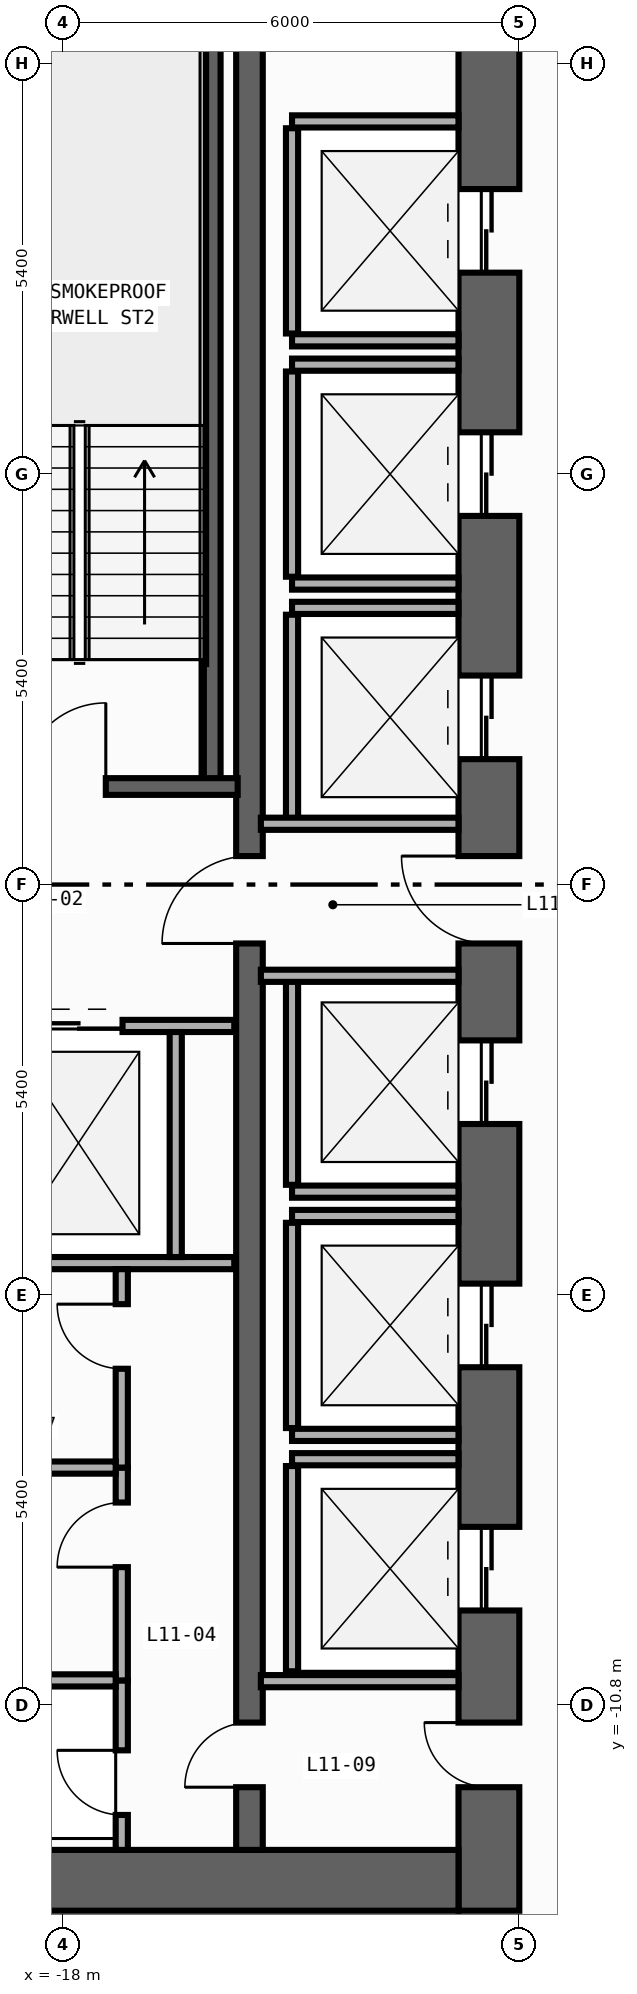
"""IFC4 building model, lengths in metres.
Left out: names, types, materials, properties, quantities, classifications, styles, units other than length and angle.
Written with IfcOpenShell. Run it as: python <this file> out.ifc"""

import sys

from ifc_helpers import new_model, si_unit, direction, frame, frame_2d, origin, place, context, subcontext, project, spatial, rectangle, extrude, element, fill, save


model = new_model("IFC4")
c1 = context("Model", 3, precision=1e-05, world=origin(), true_north=direction((0.0, 1.0)))
c2 = subcontext(c1, "Body", "Model", "MODEL_VIEW")
j1 = project(units=[si_unit("LENGTHUNIT", "METRE"), si_unit("PLANEANGLEUNIT", "RADIAN")], contexts=[c1])
p1 = place(None, origin())
s1 = spatial("IfcSite", under=j1, at=p1, CompositionType="ELEMENT")
p2 = place(p1, origin())
s2 = spatial("IfcBuilding", under=s1, at=p2, CompositionType="ELEMENT")
p3 = place(p2, frame((0.0, 0.0, 47.0)))
s3 = spatial("IfcBuildingStorey", under=s2, at=p3, CompositionType="ELEMENT", Elevation=47.0)
p4 = place(p3, frame((-12.4, -13.5, 0.0), z_axis=(0.0, 0.0, 1.0), x_axis=(0.0, 1.0, 0.0)))
e1 = element("IfcWall", 1, at=p4, inside=s3, PredefinedType="SHEAR", context=c2, shape_type="SweptSolid", body=[
    extrude(rectangle(XDim=27.0, YDim=0.8, at=frame_2d((13.5, 0.0))), origin(), (0.0, 0.0, 1.0), 3.94),
])
p5 = place(p4, frame((21.55, 0.0, 0.0)))
e2 = element("IfcOpeningElement", 2, at=p5, cuts=e1, PredefinedType="OPENING", context=c2, shape_type="SweptSolid", body=[
    extrude(rectangle(XDim=1.1, YDim=2.2, at=frame_2d((0.55, 1.1))), frame((0.0, 0.41, 0.0), z_axis=(0.0, -1.0, 0.0), x_axis=(1.0, 0.0, 0.0)), (0.0, 0.0, 1.0), 0.82),
])
p6 = place(p4, frame((18.35, 0.0, 0.0)))
e3 = element("IfcOpeningElement", 3, at=p6, cuts=e1, PredefinedType="OPENING", context=c2, shape_type="SweptSolid", body=[
    extrude(rectangle(XDim=1.1, YDim=2.2, at=frame_2d((0.55, 1.1))), frame((0.0, 0.41, 0.0), z_axis=(0.0, -1.0, 0.0), x_axis=(1.0, 0.0, 0.0)), (0.0, 0.0, 1.0), 0.82),
])
p7 = place(p4, frame((15.15, 0.0, 0.0)))
e4 = element("IfcOpeningElement", 4, at=p7, cuts=e1, PredefinedType="OPENING", context=c2, shape_type="SweptSolid", body=[
    extrude(rectangle(XDim=1.1, YDim=2.2, at=frame_2d((0.55, 1.1))), frame((0.0, 0.41, 0.0), z_axis=(0.0, -1.0, 0.0), x_axis=(1.0, 0.0, 0.0)), (0.0, 0.0, 1.0), 0.82),
])
p8 = place(p4, frame((10.35, 0.0, 0.0)))
e5 = element("IfcOpeningElement", 5, at=p8, cuts=e1, PredefinedType="OPENING", context=c2, shape_type="SweptSolid", body=[
    extrude(rectangle(XDim=1.1, YDim=2.2, at=frame_2d((0.55, 1.1))), frame((0.0, 0.41, 0.0), z_axis=(0.0, -1.0, 0.0), x_axis=(1.0, 0.0, 0.0)), (0.0, 0.0, 1.0), 0.82),
])
p9 = place(p4, frame((7.15, 0.0, 0.0)))
e6 = element("IfcOpeningElement", 6, at=p9, cuts=e1, PredefinedType="OPENING", context=c2, shape_type="SweptSolid", body=[
    extrude(rectangle(XDim=1.1, YDim=2.2, at=frame_2d((0.55, 1.1))), frame((0.0, 0.41, 0.0), z_axis=(0.0, -1.0, 0.0), x_axis=(1.0, 0.0, 0.0)), (0.0, 0.0, 1.0), 0.82),
])
p10 = place(p4, frame((3.95, 0.0, 0.0)))
e7 = element("IfcOpeningElement", 7, at=p10, cuts=e1, PredefinedType="OPENING", context=c2, shape_type="SweptSolid", body=[
    extrude(rectangle(XDim=1.1, YDim=2.2, at=frame_2d((0.55, 1.1))), frame((0.0, 0.41, 0.0), z_axis=(0.0, -1.0, 0.0), x_axis=(1.0, 0.0, 0.0)), (0.0, 0.0, 1.0), 0.82),
])
p11 = place(p4, frame((12.725, 0.0, 0.0)))
e8 = element("IfcOpeningElement", 8, at=p11, cuts=e1, PredefinedType="OPENING", context=c2, shape_type="SweptSolid", body=[
    extrude(rectangle(XDim=1.15, YDim=2.2, at=frame_2d((0.575, 1.1))), frame((0.0, 0.41, 0.0), z_axis=(0.0, -1.0, 0.0), x_axis=(1.0, 0.0, 0.0)), (0.0, 0.0, 1.0), 0.82),
])
p12 = place(p4, frame((1.625, 0.0, 0.0)))
e9 = element("IfcOpeningElement", 9, at=p12, cuts=e1, PredefinedType="OPENING", context=c2, shape_type="SweptSolid", body=[
    extrude(rectangle(XDim=0.85, YDim=2.1, at=frame_2d((0.425, 1.05))), frame((0.0, 0.41, 0.0), z_axis=(0.0, -1.0, 0.0), x_axis=(1.0, 0.0, 0.0)), (0.0, 0.0, 1.0), 0.82),
])
p13 = place(p3, frame((-19.6, -13.1, 0.0), z_axis=(0.0, 0.0, 1.0), x_axis=(1.0, 0.0, 0.0)))
e10 = element("IfcWall", 10, at=p13, inside=s3, PredefinedType="SHEAR", context=c2, shape_type="SweptSolid", body=[
    extrude(rectangle(XDim=6.8, YDim=0.8, at=frame_2d((3.4, 0.0))), origin(), (0.0, 0.0, 1.0), 3.94),
])
p14 = place(p3, frame((-15.55, -12.7, 0.0), z_axis=(0.0, 0.0, 1.0), x_axis=(0.0, 1.0, 0.0)))
e11 = element("IfcWall", 11, at=p14, inside=s3, PredefinedType="SHEAR", context=c2, shape_type="SweptSolid", body=[
    extrude(rectangle(XDim=25.4, YDim=0.35, at=frame_2d((12.7, 0.0))), origin(), (0.0, 0.0, 1.0), 3.94),
])
p15 = place(p14, frame((11.925, 0.0, 0.0)))
e12 = element("IfcOpeningElement", 12, at=p15, cuts=e11, PredefinedType="OPENING", context=c2, shape_type="SweptSolid", body=[
    extrude(rectangle(XDim=1.15, YDim=2.2, at=frame_2d((0.575, 1.1))), frame((0.0, 0.185, 0.0), z_axis=(0.0, -1.0, 0.0), x_axis=(1.0, 0.0, 0.0)), (0.0, 0.0, 1.0), 0.37),
])
p16 = place(p14, frame((0.825, 0.0, 0.0)))
e13 = element("IfcOpeningElement", 13, at=p16, cuts=e11, PredefinedType="OPENING", context=c2, shape_type="SweptSolid", body=[
    extrude(rectangle(XDim=0.85, YDim=2.1, at=frame_2d((0.425, 1.05))), frame((0.0, 0.185, 0.0), z_axis=(0.0, -1.0, 0.0), x_axis=(1.0, 0.0, 0.0)), (0.0, 0.0, 1.0), 0.37),
])
p17 = place(p3, frame((-16.04, 1.29, 0.0), z_axis=(0.0, 0.0, 1.0), x_axis=(0.0, 1.0, 0.0)))
e14 = element("IfcWall", 14, at=p17, inside=s3, PredefinedType="SHEAR", context=c2, shape_type="SweptSolid", body=[
    extrude(rectangle(XDim=11.3, YDim=0.22, at=frame_2d((5.65, 0.0))), origin(), (0.0, 0.0, 1.0), 3.94),
])
p18 = place(p3, frame((-19.62, 1.29, 0.0), z_axis=(0.0, 0.0, 1.0), x_axis=(1.0, 0.0, 0.0)))
e15 = element("IfcWall", 15, at=p18, inside=s3, PredefinedType="SHEAR", context=c2, shape_type="SweptSolid", body=[
    extrude(rectangle(XDim=3.915, YDim=0.22, at=frame_2d((1.958, 0.0))), origin(), (0.0, 0.0, 1.0), 3.94),
])
p19 = place(p18, frame((1.08, 0.0, 0.0)))
e16 = element("IfcOpeningElement", 16, at=p19, cuts=e15, PredefinedType="OPENING", context=c2, shape_type="SweptSolid", body=[
    extrude(rectangle(XDim=1.1, YDim=2.2, at=frame_2d((0.55, 1.1))), frame((0.0, 0.12, 0.0), z_axis=(0.0, -1.0, 0.0), x_axis=(1.0, 0.0, 0.0)), (0.0, 0.0, 1.0), 0.24),
])
for number, where, z_axis, x_axis in (
    (17, (-14.99, 7.16, 0.0), (0.0, 0.0, 1.0), (1.0, 0.0, 0.0)),
    (18, (-14.99, 10.04, 0.0), (0.0, 0.0, 1.0), (1.0, 0.0, 0.0)),
):
    element("IfcWall", number, at=place(p3, frame(where, z_axis=z_axis, x_axis=x_axis)), inside=s3, PredefinedType="STANDARD", context=c2, shape_type="SweptSolid", body=[
        extrude(rectangle(XDim=2.19, YDim=0.16, at=frame_2d((1.095, 0.0))), origin(), (0.0, 0.0, 1.0), 3.94),
    ])
p20 = place(p3, frame((-14.99, 7.25, 0.0), z_axis=(0.0, 0.0, 1.0), x_axis=(0.0, 1.0, 0.0)))
e19 = element("IfcWall", 19, at=p20, inside=s3, PredefinedType="STANDARD", context=c2, shape_type="SweptSolid", body=[
    extrude(rectangle(XDim=2.7, YDim=0.16, at=frame_2d((1.35, 0.0))), origin(), (0.0, 0.0, 1.0), 3.94),
])
for number, where, z_axis, x_axis in (
    (20, (-14.99, 3.96, 0.0), (0.0, 0.0, 1.0), (1.0, 0.0, 0.0)),
    (21, (-14.99, 6.84, 0.0), (0.0, 0.0, 1.0), (1.0, 0.0, 0.0)),
):
    element("IfcWall", number, at=place(p3, frame(where, z_axis=z_axis, x_axis=x_axis)), inside=s3, PredefinedType="STANDARD", context=c2, shape_type="SweptSolid", body=[
        extrude(rectangle(XDim=2.19, YDim=0.16, at=frame_2d((1.095, 0.0))), origin(), (0.0, 0.0, 1.0), 3.94),
    ])
p21 = place(p3, frame((-14.99, 4.05, 0.0), z_axis=(0.0, 0.0, 1.0), x_axis=(0.0, 1.0, 0.0)))
e22 = element("IfcWall", 22, at=p21, inside=s3, PredefinedType="STANDARD", context=c2, shape_type="SweptSolid", body=[
    extrude(rectangle(XDim=2.7, YDim=0.16, at=frame_2d((1.35, 0.0))), origin(), (0.0, 0.0, 1.0), 3.94),
])
p22 = place(p3, frame((-14.99, 3.64, 0.0), z_axis=(0.0, 0.0, 1.0), x_axis=(1.0, 0.0, 0.0)))
e23 = element("IfcWall", 23, at=p22, inside=s3, PredefinedType="STANDARD", context=c2, shape_type="SweptSolid", body=[
    extrude(rectangle(XDim=2.19, YDim=0.16, at=frame_2d((1.095, 0.0))), origin(), (0.0, 0.0, 1.0), 3.94),
])
p23 = place(p3, frame((-14.99, 0.85, 0.0), z_axis=(0.0, 0.0, 1.0), x_axis=(0.0, 1.0, 0.0)))
e24 = element("IfcWall", 24, at=p23, inside=s3, PredefinedType="STANDARD", context=c2, shape_type="SweptSolid", body=[
    extrude(rectangle(XDim=2.7, YDim=0.16, at=frame_2d((1.35, 0.0))), origin(), (0.0, 0.0, 1.0), 3.94),
])
p24 = place(p3, frame((-14.99, -4.04, 0.0), z_axis=(0.0, 0.0, 1.0), x_axis=(1.0, 0.0, 0.0)))
e25 = element("IfcWall", 25, at=p24, inside=s3, PredefinedType="STANDARD", context=c2, shape_type="SweptSolid", body=[
    extrude(rectangle(XDim=2.19, YDim=0.16, at=frame_2d((1.095, 0.0))), origin(), (0.0, 0.0, 1.0), 3.94),
])
p25 = place(p3, frame((-14.99, -3.95, 0.0), z_axis=(0.0, 0.0, 1.0), x_axis=(0.0, 1.0, 0.0)))
e26 = element("IfcWall", 26, at=p25, inside=s3, PredefinedType="STANDARD", context=c2, shape_type="SweptSolid", body=[
    extrude(rectangle(XDim=2.7, YDim=0.16, at=frame_2d((1.35, 0.0))), origin(), (0.0, 0.0, 1.0), 3.94),
])
for number, where, z_axis, x_axis in (
    (27, (-14.99, -7.24, 0.0), (0.0, 0.0, 1.0), (1.0, 0.0, 0.0)),
    (28, (-14.99, -4.36, 0.0), (0.0, 0.0, 1.0), (1.0, 0.0, 0.0)),
):
    element("IfcWall", number, at=place(p3, frame(where, z_axis=z_axis, x_axis=x_axis)), inside=s3, PredefinedType="STANDARD", context=c2, shape_type="SweptSolid", body=[
        extrude(rectangle(XDim=2.19, YDim=0.16, at=frame_2d((1.095, 0.0))), origin(), (0.0, 0.0, 1.0), 3.94),
    ])
p26 = place(p3, frame((-14.99, -7.15, 0.0), z_axis=(0.0, 0.0, 1.0), x_axis=(0.0, 1.0, 0.0)))
e29 = element("IfcWall", 29, at=p26, inside=s3, PredefinedType="STANDARD", context=c2, shape_type="SweptSolid", body=[
    extrude(rectangle(XDim=2.7, YDim=0.16, at=frame_2d((1.35, 0.0))), origin(), (0.0, 0.0, 1.0), 3.94),
])
p27 = place(p3, frame((-14.99, -7.56, 0.0), z_axis=(0.0, 0.0, 1.0), x_axis=(1.0, 0.0, 0.0)))
e30 = element("IfcWall", 30, at=p27, inside=s3, PredefinedType="STANDARD", context=c2, shape_type="SweptSolid", body=[
    extrude(rectangle(XDim=2.19, YDim=0.16, at=frame_2d((1.095, 0.0))), origin(), (0.0, 0.0, 1.0), 3.94),
])
p28 = place(p3, frame((-14.99, -10.35, 0.0), z_axis=(0.0, 0.0, 1.0), x_axis=(0.0, 1.0, 0.0)))
e31 = element("IfcWall", 31, at=p28, inside=s3, PredefinedType="STANDARD", context=c2, shape_type="SweptSolid", body=[
    extrude(rectangle(XDim=2.7, YDim=0.16, at=frame_2d((1.35, 0.0))), origin(), (0.0, 0.0, 1.0), 3.94),
])
p29 = place(p3, frame((-19.55, -1.86, 0.0), z_axis=(0.0, 0.0, 1.0), x_axis=(1.0, 0.0, 0.0)))
e32 = element("IfcWall", 32, at=p29, inside=s3, PredefinedType="STANDARD", context=c2, shape_type="SweptSolid", body=[
    extrude(rectangle(XDim=3.8, YDim=0.16, at=frame_2d((1.9, 0.0))), origin(), (0.0, 0.0, 1.0), 3.94),
])
p30 = place(p29, frame((1.18, 0.0, 0.0)))
e33 = element("IfcOpeningElement", 33, at=p30, cuts=e32, PredefinedType="OPENING", context=c2, shape_type="SweptSolid", body=[
    extrude(rectangle(XDim=1.15, YDim=2.2, at=frame_2d((0.575, 1.1))), frame((0.0, 0.09, 0.0), z_axis=(0.0, -1.0, 0.0), x_axis=(1.0, 0.0, 0.0)), (0.0, 0.0, 1.0), 0.18),
])
p31 = place(p3, frame((-19.55, -4.98, 0.0), z_axis=(0.0, 0.0, 1.0), x_axis=(1.0, 0.0, 0.0)))
e34 = element("IfcWall", 34, at=p31, inside=s3, PredefinedType="STANDARD", context=c2, shape_type="SweptSolid", body=[
    extrude(rectangle(XDim=3.8, YDim=0.16, at=frame_2d((1.9, 0.0))), origin(), (0.0, 0.0, 1.0), 3.94),
])
p32 = place(p3, frame((-16.52, -4.9, 0.0), z_axis=(0.0, 0.0, 1.0), x_axis=(0.0, 1.0, 0.0)))
e35 = element("IfcWall", 35, at=p32, inside=s3, PredefinedType="STANDARD", context=c2, shape_type="SweptSolid", body=[
    extrude(rectangle(XDim=2.96, YDim=0.16, at=frame_2d((1.48, 0.0))), origin(), (0.0, 0.0, 1.0), 3.94),
])
for number, where, z_axis, x_axis in (
    (36, (-15.4, 0.8, 0.0), (0.0, 0.0, 1.0), (1.0, 0.0, 0.0)),
    (37, (-15.4, -1.2, 0.0), (0.0, 0.0, 1.0), (1.0, 0.0, 0.0)),
    (38, (-15.4, -10.48, 0.0), (0.0, 0.0, 1.0), (1.0, 0.0, 0.0)),
):
    element("IfcWall", number, at=place(p3, frame(where, z_axis=z_axis, x_axis=x_axis)), inside=s3, PredefinedType="STANDARD", context=c2, shape_type="SweptSolid", body=[
        extrude(rectangle(XDim=2.6, YDim=0.16, at=frame_2d((1.3, 0.0))), origin(), (0.0, 0.0, 1.0), 3.94),
    ])
p33 = place(p3, frame((-17.23, -12.7, 0.0), z_axis=(0.0, 0.0, 1.0), x_axis=(0.0, 1.0, 0.0)))
e39 = element("IfcWall", 39, at=p33, inside=s3, PredefinedType="PARTITIONING", context=c2, shape_type="SweptSolid", body=[
    extrude(rectangle(XDim=2.23, YDim=0.16, at=frame_2d((1.115, 0.0))), origin(), (0.0, 0.0, 1.0), 3.94),
])
p34 = place(p33, frame((0.46, 0.0, 0.0)))
e40 = element("IfcOpeningElement", 40, at=p34, cuts=e39, PredefinedType="OPENING", context=c2, shape_type="SweptSolid", body=[
    extrude(rectangle(XDim=0.85, YDim=2.1, at=frame_2d((0.425, 1.05))), frame((0.0, 0.09, 0.0), z_axis=(0.0, -1.0, 0.0), x_axis=(1.0, 0.0, 0.0)), (0.0, 0.0, 1.0), 0.18),
])
p35 = place(p3, frame((-17.23, -10.47, 0.0), z_axis=(0.0, 0.0, 1.0), x_axis=(0.0, 1.0, 0.0)))
e41 = element("IfcWall", 41, at=p35, inside=s3, PredefinedType="PARTITIONING", context=c2, shape_type="SweptSolid", body=[
    extrude(rectangle(XDim=2.8, YDim=0.16, at=frame_2d((1.4, 0.0))), origin(), (0.0, 0.0, 1.0), 3.94),
])
p36 = place(p35, frame((1.49, 0.0, 0.0)))
e42 = element("IfcOpeningElement", 42, at=p36, cuts=e41, PredefinedType="OPENING", context=c2, shape_type="SweptSolid", body=[
    extrude(rectangle(XDim=0.85, YDim=2.1, at=frame_2d((0.425, 1.05))), frame((0.0, 0.09, 0.0), z_axis=(0.0, -1.0, 0.0), x_axis=(1.0, 0.0, 0.0)), (0.0, 0.0, 1.0), 0.18),
])
p37 = place(p3, frame((-17.23, -7.67, 0.0), z_axis=(0.0, 0.0, 1.0), x_axis=(0.0, 1.0, 0.0)))
e43 = element("IfcWall", 43, at=p37, inside=s3, PredefinedType="PARTITIONING", context=c2, shape_type="SweptSolid", body=[
    extrude(rectangle(XDim=2.61, YDim=0.16, at=frame_2d((1.305, 0.0))), origin(), (0.0, 0.0, 1.0), 3.94),
])
p38 = place(p37, frame((1.3, 0.0, 0.0)))
e44 = element("IfcOpeningElement", 44, at=p38, cuts=e43, PredefinedType="OPENING", context=c2, shape_type="SweptSolid", body=[
    extrude(rectangle(XDim=0.85, YDim=2.1, at=frame_2d((0.425, 1.05))), frame((0.0, 0.09, 0.0), z_axis=(0.0, -1.0, 0.0), x_axis=(1.0, 0.0, 0.0)), (0.0, 0.0, 1.0), 0.18),
])
for number, where, z_axis, x_axis in (
    (45, (-19.6, -10.47, 0.0), (0.0, 0.0, 1.0), (1.0, 0.0, 0.0)),
    (46, (-19.6, -7.67, 0.0), (0.0, 0.0, 1.0), (1.0, 0.0, 0.0)),
):
    element("IfcWall", number, at=place(p3, frame(where, z_axis=z_axis, x_axis=x_axis)), inside=s3, PredefinedType="PARTITIONING", context=c2, shape_type="SweptSolid", body=[
        extrude(rectangle(XDim=2.29, YDim=0.16, at=frame_2d((1.145, 0.0))), origin(), (0.0, 0.0, 1.0), 3.94),
    ])
p39 = place(p19, origin())
e47 = element("IfcDoor", 47, at=p39, inside=s3, OperationType="SINGLE_SWING_RIGHT", PredefinedType="DOOR", context=c2, shape_type="SweptSolid", body=[
    extrude(rectangle(XDim=1.1, YDim=2.2, at=frame_2d((0.55, 1.1))), frame((0.0, 0.025, 0.0), z_axis=(0.0, -1.0, 0.0), x_axis=(1.0, 0.0, 0.0)), (0.0, 0.0, 1.0), 0.05),
])
fill(e16, e47)
p40 = place(p5, origin())
e48 = element("IfcDoor", 48, at=p40, inside=s3, OperationType="DOUBLE_DOOR_SLIDING", PredefinedType="DOOR", context=c2, shape_type="SweptSolid", body=[
    extrude(rectangle(XDim=1.1, YDim=2.2, at=frame_2d((0.55, 1.1))), frame((0.0, 0.025, 0.0), z_axis=(0.0, -1.0, 0.0), x_axis=(1.0, 0.0, 0.0)), (0.0, 0.0, 1.0), 0.05),
])
fill(e2, e48)
p41 = place(p6, origin())
e49 = element("IfcDoor", 49, at=p41, inside=s3, OperationType="DOUBLE_DOOR_SLIDING", PredefinedType="DOOR", context=c2, shape_type="SweptSolid", body=[
    extrude(rectangle(XDim=1.1, YDim=2.2, at=frame_2d((0.55, 1.1))), frame((0.0, 0.025, 0.0), z_axis=(0.0, -1.0, 0.0), x_axis=(1.0, 0.0, 0.0)), (0.0, 0.0, 1.0), 0.05),
])
fill(e3, e49)
p42 = place(p7, origin())
e50 = element("IfcDoor", 50, at=p42, inside=s3, OperationType="DOUBLE_DOOR_SLIDING", PredefinedType="DOOR", context=c2, shape_type="SweptSolid", body=[
    extrude(rectangle(XDim=1.1, YDim=2.2, at=frame_2d((0.55, 1.1))), frame((0.0, 0.025, 0.0), z_axis=(0.0, -1.0, 0.0), x_axis=(1.0, 0.0, 0.0)), (0.0, 0.0, 1.0), 0.05),
])
fill(e4, e50)
p43 = place(p8, origin())
e51 = element("IfcDoor", 51, at=p43, inside=s3, OperationType="DOUBLE_DOOR_SLIDING", PredefinedType="DOOR", context=c2, shape_type="SweptSolid", body=[
    extrude(rectangle(XDim=1.1, YDim=2.2, at=frame_2d((0.55, 1.1))), frame((0.0, 0.025, 0.0), z_axis=(0.0, -1.0, 0.0), x_axis=(1.0, 0.0, 0.0)), (0.0, 0.0, 1.0), 0.05),
])
fill(e5, e51)
p44 = place(p9, origin())
e52 = element("IfcDoor", 52, at=p44, inside=s3, OperationType="DOUBLE_DOOR_SLIDING", PredefinedType="DOOR", context=c2, shape_type="SweptSolid", body=[
    extrude(rectangle(XDim=1.1, YDim=2.2, at=frame_2d((0.55, 1.1))), frame((0.0, 0.025, 0.0), z_axis=(0.0, -1.0, 0.0), x_axis=(1.0, 0.0, 0.0)), (0.0, 0.0, 1.0), 0.05),
])
fill(e6, e52)
p45 = place(p10, origin())
e53 = element("IfcDoor", 53, at=p45, inside=s3, OperationType="DOUBLE_DOOR_SLIDING", PredefinedType="DOOR", context=c2, shape_type="SweptSolid", body=[
    extrude(rectangle(XDim=1.1, YDim=2.2, at=frame_2d((0.55, 1.1))), frame((0.0, 0.025, 0.0), z_axis=(0.0, -1.0, 0.0), x_axis=(1.0, 0.0, 0.0)), (0.0, 0.0, 1.0), 0.05),
])
fill(e7, e53)
p46 = place(p11, origin())
e54 = element("IfcDoor", 54, at=p46, inside=s3, OperationType="SINGLE_SWING_RIGHT", PredefinedType="DOOR", context=c2, shape_type="SweptSolid", body=[
    extrude(rectangle(XDim=1.15, YDim=2.2, at=frame_2d((0.575, 1.1))), frame((0.0, 0.025, 0.0), z_axis=(0.0, -1.0, 0.0), x_axis=(1.0, 0.0, 0.0)), (0.0, 0.0, 1.0), 0.05),
])
fill(e8, e54)
p47 = place(p15, origin())
e55 = element("IfcDoor", 55, at=p47, inside=s3, OperationType="SINGLE_SWING_LEFT", PredefinedType="DOOR", context=c2, shape_type="SweptSolid", body=[
    extrude(rectangle(XDim=1.15, YDim=2.2, at=frame_2d((0.575, 1.1))), frame((0.0, 0.025, 0.0), z_axis=(0.0, -1.0, 0.0), x_axis=(1.0, 0.0, 0.0)), (0.0, 0.0, 1.0), 0.05),
])
fill(e12, e55)
p48 = place(p12, origin())
e56 = element("IfcDoor", 56, at=p48, inside=s3, OperationType="SINGLE_SWING_RIGHT", PredefinedType="DOOR", context=c2, shape_type="SweptSolid", body=[
    extrude(rectangle(XDim=0.85, YDim=2.1, at=frame_2d((0.425, 1.05))), frame((0.0, 0.025, 0.0), z_axis=(0.0, -1.0, 0.0), x_axis=(1.0, 0.0, 0.0)), (0.0, 0.0, 1.0), 0.05),
])
fill(e9, e56)
p49 = place(p16, origin())
e57 = element("IfcDoor", 57, at=p49, inside=s3, OperationType="SINGLE_SWING_LEFT", PredefinedType="DOOR", context=c2, shape_type="SweptSolid", body=[
    extrude(rectangle(XDim=0.85, YDim=2.1, at=frame_2d((0.425, 1.05))), frame((0.0, 0.025, 0.0), z_axis=(0.0, -1.0, 0.0), x_axis=(1.0, 0.0, 0.0)), (0.0, 0.0, 1.0), 0.05),
])
fill(e13, e57)
p50 = place(p30, origin())
e58 = element("IfcDoor", 58, at=p50, inside=s3, OperationType="DOUBLE_DOOR_SLIDING", PredefinedType="DOOR", context=c2, shape_type="SweptSolid", body=[
    extrude(rectangle(XDim=1.15, YDim=2.2, at=frame_2d((0.575, 1.1))), frame((0.0, 0.025, 0.0), z_axis=(0.0, -1.0, 0.0), x_axis=(1.0, 0.0, 0.0)), (0.0, 0.0, 1.0), 0.05),
])
fill(e33, e58)
p51 = place(p34, origin())
e59 = element("IfcDoor", 59, at=p51, inside=s3, OperationType="SINGLE_SWING_RIGHT", PredefinedType="DOOR", context=c2, shape_type="SweptSolid", body=[
    extrude(rectangle(XDim=0.85, YDim=2.1, at=frame_2d((0.425, 1.05))), frame((0.0, 0.025, 0.0), z_axis=(0.0, -1.0, 0.0), x_axis=(1.0, 0.0, 0.0)), (0.0, 0.0, 1.0), 0.05),
])
fill(e40, e59)
p52 = place(p36, origin())
e60 = element("IfcDoor", 60, at=p52, inside=s3, OperationType="SINGLE_SWING_LEFT", PredefinedType="DOOR", context=c2, shape_type="SweptSolid", body=[
    extrude(rectangle(XDim=0.85, YDim=2.1, at=frame_2d((0.425, 1.05))), frame((0.0, 0.025, 0.0), z_axis=(0.0, -1.0, 0.0), x_axis=(1.0, 0.0, 0.0)), (0.0, 0.0, 1.0), 0.05),
])
fill(e42, e60)
p53 = place(p38, origin())
e61 = element("IfcDoor", 61, at=p53, inside=s3, OperationType="SINGLE_SWING_RIGHT", PredefinedType="DOOR", context=c2, shape_type="SweptSolid", body=[
    extrude(rectangle(XDim=0.85, YDim=2.1, at=frame_2d((0.425, 1.05))), frame((0.0, 0.025, 0.0), z_axis=(0.0, -1.0, 0.0), x_axis=(1.0, 0.0, 0.0)), (0.0, 0.0, 1.0), 0.05),
])
fill(e44, e61)
save(model, sys.argv[1])
